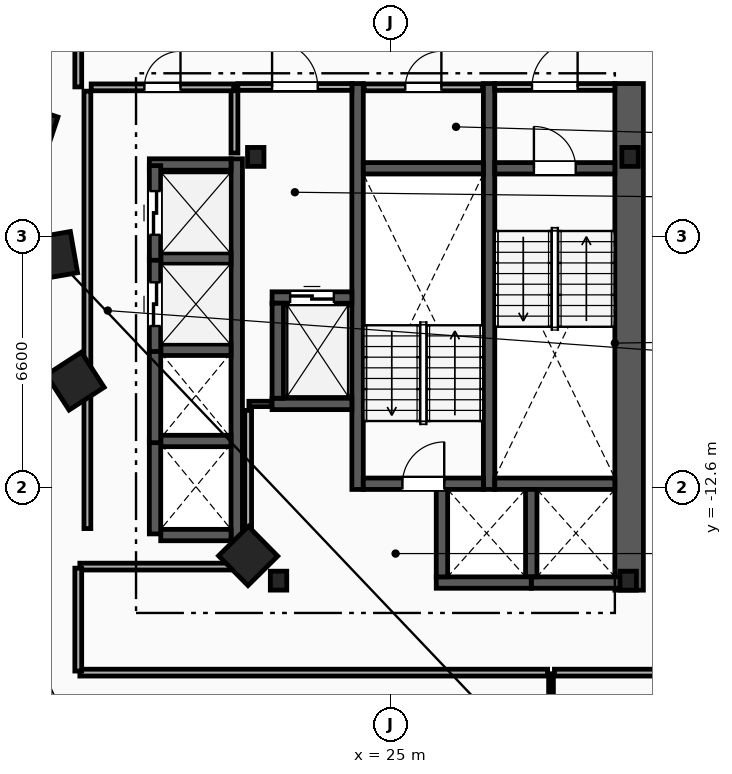
"""IFC4 building model, lengths in metres.
Left out: names, types, materials, properties, quantities, classifications, styles, units other than length and angle.
Written with IfcOpenShell. Run it as: python <this file> out.ifc"""

import sys

from ifc_helpers import new_model, si_unit, direction, frame, frame_2d, origin, origin_2d, place, context, subcontext, project, spatial, rectangle, i_section, extrude, element, fill, save


model = new_model("IFC4")
c1 = context("Model", 3, precision=1e-05, world=origin(), true_north=direction((0.0, 1.0)))
c2 = subcontext(c1, "Body", "Model", "MODEL_VIEW")
j1 = project(units=[si_unit("LENGTHUNIT", "METRE"), si_unit("PLANEANGLEUNIT", "RADIAN")], contexts=[c1])
p1 = place(None, origin())
s1 = spatial("IfcSite", under=j1, at=p1, CompositionType="ELEMENT")
p2 = place(p1, origin())
s2 = spatial("IfcBuilding", under=s1, at=p2, CompositionType="ELEMENT")
p3 = place(p2, frame((0.0, 0.0, 89.0)))
s3 = spatial("IfcBuildingStorey", under=s2, at=p3, CompositionType="ELEMENT", Elevation=89.0)
for number, where, z_axis, x_axis in (
    (1, (31.3, -3.9, 0.0), (0.0, 0.0, 1.0), (1.0, 0.0, 0.0)),
    (2, (21.45, -3.9, 0.0), (0.0, 0.0, 1.0), (1.0, 0.0, 0.0)),
    (3, (22.05, -15.05, 0.0), (0.0, 0.0, 1.0), (1.0, 0.0, 0.0)),
    (4, (31.25, -15.05, 0.0), (0.0, 0.0, 1.0), (1.0, 0.0, 0.0)),
):
    element("IfcColumn", number, at=place(p3, frame(where, z_axis=z_axis, x_axis=x_axis)), inside=s3, PredefinedType="COLUMN", context=c2, shape_type="SweptSolid", body=[
        extrude(i_section(OverallWidth=0.432, OverallDepth=0.498, WebThickness=0.056, FlangeThickness=0.089, FilletRadius=0.018, at=origin_2d()), origin(), (0.0, 0.0, 1.0), 3.6),
    ])
for number, where, z_axis, x_axis in (
    (5, (15.55, -3.2, 0.0), (0.0, 0.0, 1.0), (-0.315, -0.949, 0.0)),
    (6, (16.125, -6.5, 0.0), (0.0, 0.0, 1.0), (0.172, -0.985, 0.0)),
    (7, (16.7, -9.8, 0.0), (0.0, 0.0, 1.0), (0.544, -0.839, 0.0)),
    (8, (21.25, -14.4, 0.0), (0.0, 0.0, 1.0), (0.703, -0.711, 0.0)),
):
    element("IfcColumn", number, at=place(p3, frame(where, z_axis=z_axis, x_axis=x_axis)), inside=s3, PredefinedType="COLUMN", context=c2, shape_type="SweptSolid", body=[
        extrude(rectangle(XDim=1.1, YDim=1.1, at=origin_2d()), origin(), (0.0, 0.0, 1.0), 3.6),
    ])
p4 = place(p3, frame((31.275, -15.3, 0.0), z_axis=(0.0, 0.0, 1.0), x_axis=(0.0, 1.0, 0.0)))
e9 = element("IfcWall", 9, at=p4, inside=s3, PredefinedType="SHEAR", context=c2, shape_type="SweptSolid", body=[
    extrude(rectangle(XDim=13.33, YDim=0.75, at=frame_2d((6.665, 0.0))), origin(), (0.0, 0.0, 1.0), 3.3),
])
for number, where, z_axis, x_axis in (
    (10, (27.59, -12.65, 0.0), (0.0, 0.0, 1.0), (0.0, 1.0, 0.0)),
    (11, (24.13, -12.65, 0.0), (0.0, 0.0, 1.0), (0.0, 1.0, 0.0)),
):
    element("IfcWall", number, at=place(p3, frame(where, z_axis=z_axis, x_axis=x_axis)), inside=s3, PredefinedType="SHEAR", context=c2, shape_type="SweptSolid", body=[
        extrude(rectangle(XDim=10.68, YDim=0.3, at=frame_2d((5.34, 0.0))), origin(), (0.0, 0.0, 1.0), 3.3),
    ])
p5 = place(p3, frame((27.74, -4.2, 0.0), z_axis=(0.0, 0.0, 1.0), x_axis=(1.0, 0.0, 0.0)))
e12 = element("IfcWall", 12, at=p5, inside=s3, PredefinedType="SHEAR", context=c2, shape_type="SweptSolid", body=[
    extrude(rectangle(XDim=3.16, YDim=0.3, at=frame_2d((1.58, 0.0))), origin(), (0.0, 0.0, 1.0), 3.3),
])
p6 = place(p5, frame((1.03, 0.0, 0.0)))
e13 = element("IfcOpeningElement", 13, at=p6, cuts=e12, PredefinedType="OPENING", context=c2, shape_type="SweptSolid", body=[
    extrude(rectangle(XDim=1.1, YDim=2.15, at=frame_2d((0.55, 1.075))), frame((0.0, 0.16, 0.0), z_axis=(0.0, -1.0, 0.0), x_axis=(1.0, 0.0, 0.0)), (0.0, 0.0, 1.0), 0.32),
])
p7 = place(p3, frame((27.74, -12.5, 0.0), z_axis=(0.0, 0.0, 1.0), x_axis=(1.0, 0.0, 0.0)))
e14 = element("IfcWall", 14, at=p7, inside=s3, PredefinedType="SHEAR", context=c2, shape_type="SweptSolid", body=[
    extrude(rectangle(XDim=3.16, YDim=0.3, at=frame_2d((1.58, 0.0))), origin(), (0.0, 0.0, 1.0), 3.3),
])
p8 = place(p3, frame((24.28, -12.5, 0.0), z_axis=(0.0, 0.0, 1.0), x_axis=(1.0, 0.0, 0.0)))
e15 = element("IfcWall", 15, at=p8, inside=s3, PredefinedType="SHEAR", context=c2, shape_type="SweptSolid", body=[
    extrude(rectangle(XDim=3.16, YDim=0.3, at=frame_2d((1.58, 0.0))), origin(), (0.0, 0.0, 1.0), 3.3),
])
p9 = place(p8, frame((1.03, 0.0, 0.0)))
e16 = element("IfcOpeningElement", 16, at=p9, cuts=e15, PredefinedType="OPENING", context=c2, shape_type="SweptSolid", body=[
    extrude(rectangle(XDim=1.1, YDim=2.15, at=frame_2d((0.55, 1.075))), frame((0.0, 0.16, 0.0), z_axis=(0.0, -1.0, 0.0), x_axis=(1.0, 0.0, 0.0)), (0.0, 0.0, 1.0), 0.32),
])
p10 = place(p3, frame((24.28, -4.2, 0.0), z_axis=(0.0, 0.0, 1.0), x_axis=(1.0, 0.0, 0.0)))
e17 = element("IfcWall", 17, at=p10, inside=s3, PredefinedType="SHEAR", context=c2, shape_type="SweptSolid", body=[
    extrude(rectangle(XDim=3.16, YDim=0.3, at=frame_2d((1.58, 0.0))), origin(), (0.0, 0.0, 1.0), 3.3),
])
p11 = place(p3, frame((20.89, -3.8, 0.0), z_axis=(0.0, 0.0, 1.0), x_axis=(0.0, 1.0, 0.0)))
e18 = element("IfcWall", 18, at=p11, inside=s3, PredefinedType="PARTITIONING", context=c2, shape_type="SweptSolid", body=[
    extrude(rectangle(XDim=1.65, YDim=0.18, at=frame_2d((0.825, 0.0))), origin(), (0.0, 0.0, 1.0), 3.3),
])
p12 = place(p3, frame((20.98, -2.06, 0.0), z_axis=(0.0, 0.0, 1.0), x_axis=(1.0, 0.0, 0.0)))
e19 = element("IfcWall", 19, at=p12, inside=s3, PredefinedType="PARTITIONING", context=c2, shape_type="SweptSolid", body=[
    extrude(rectangle(XDim=3.0, YDim=0.18, at=frame_2d((1.5, 0.0))), origin(), (0.0, 0.0, 1.0), 3.3),
])
p13 = place(p12, frame((0.9, 0.0, 0.0)))
e20 = element("IfcOpeningElement", 20, at=p13, cuts=e19, PredefinedType="OPENING", context=c2, shape_type="SweptSolid", body=[
    extrude(rectangle(XDim=1.2, YDim=2.15, at=frame_2d((0.6, 1.075))), frame((0.0, 0.1, 0.0), z_axis=(0.0, -1.0, 0.0), x_axis=(1.0, 0.0, 0.0)), (0.0, 0.0, 1.0), 0.2),
])
p14 = place(p3, frame((27.74, -2.06, 0.0), z_axis=(0.0, 0.0, 1.0), x_axis=(1.0, 0.0, 0.0)))
e21 = element("IfcWall", 21, at=p14, inside=s3, PredefinedType="PARTITIONING", context=c2, shape_type="SweptSolid", body=[
    extrude(rectangle(XDim=3.16, YDim=0.18, at=frame_2d((1.58, 0.0))), origin(), (0.0, 0.0, 1.0), 3.3),
])
p15 = place(p14, frame((0.98, 0.0, 0.0)))
e22 = element("IfcOpeningElement", 22, at=p15, cuts=e21, PredefinedType="OPENING", context=c2, shape_type="SweptSolid", body=[
    extrude(rectangle(XDim=1.2, YDim=2.15, at=frame_2d((0.6, 1.075))), frame((0.0, 0.1, 0.0), z_axis=(0.0, -1.0, 0.0), x_axis=(1.0, 0.0, 0.0)), (0.0, 0.0, 1.0), 0.2),
])
p16 = place(p3, frame((21.88, -7.6, 0.0), z_axis=(0.0, 0.0, 1.0), x_axis=(1.0, 0.0, 0.0)))
e23 = element("IfcWall", 23, at=p16, inside=s3, PredefinedType="SHEAR", context=c2, shape_type="SweptSolid", body=[
    extrude(rectangle(XDim=2.1, YDim=0.3, at=frame_2d((1.05, 0.0))), origin(), (0.0, 0.0, 1.0), 3.3),
])
p17 = place(p16, frame((0.475, 0.0, 0.0)))
e24 = element("IfcOpeningElement", 24, at=p17, cuts=e23, PredefinedType="OPENING", context=c2, shape_type="SweptSolid", body=[
    extrude(rectangle(XDim=1.15, YDim=2.2, at=frame_2d((0.575, 1.1))), frame((0.0, 0.16, 0.0), z_axis=(0.0, -1.0, 0.0), x_axis=(1.0, 0.0, 0.0)), (0.0, 0.0, 1.0), 0.32),
])
p18 = place(p3, frame((21.88, -10.4, 0.0), z_axis=(0.0, 0.0, 1.0), x_axis=(1.0, 0.0, 0.0)))
e25 = element("IfcWall", 25, at=p18, inside=s3, PredefinedType="SHEAR", context=c2, shape_type="SweptSolid", body=[
    extrude(rectangle(XDim=2.1, YDim=0.3, at=frame_2d((1.05, 0.0))), origin(), (0.0, 0.0, 1.0), 3.3),
])
for number, where, z_axis, x_axis in (
    (26, (22.03, -10.25, 0.0), (0.0, 0.0, 1.0), (0.0, 1.0, 0.0)),
    (27, (28.7, -15.1, 0.0), (0.0, 0.0, 1.0), (1.0, 0.0, 0.0)),
):
    element("IfcWall", number, at=place(p3, frame(where, z_axis=z_axis, x_axis=x_axis)), inside=s3, PredefinedType="SHEAR", context=c2, shape_type="SweptSolid", body=[
        extrude(rectangle(XDim=2.5, YDim=0.3, at=frame_2d((1.25, 0.0))), origin(), (0.0, 0.0, 1.0), 3.3),
    ])
p19 = place(p3, frame((28.7, -14.95, 0.0), z_axis=(0.0, 0.0, 1.0), x_axis=(0.0, 1.0, 0.0)))
e28 = element("IfcWall", 28, at=p19, inside=s3, PredefinedType="SHEAR", context=c2, shape_type="SweptSolid", body=[
    extrude(rectangle(XDim=2.3, YDim=0.3, at=frame_2d((1.15, 0.0))), origin(), (0.0, 0.0, 1.0), 3.3),
])
p20 = place(p3, frame((26.2, -15.1, 0.0), z_axis=(0.0, 0.0, 1.0), x_axis=(1.0, 0.0, 0.0)))
e29 = element("IfcWall", 29, at=p20, inside=s3, PredefinedType="SHEAR", context=c2, shape_type="SweptSolid", body=[
    extrude(rectangle(XDim=2.5, YDim=0.3, at=frame_2d((1.25, 0.0))), origin(), (0.0, 0.0, 1.0), 3.3),
])
p21 = place(p3, frame((26.35, -14.95, 0.0), z_axis=(0.0, 0.0, 1.0), x_axis=(0.0, 1.0, 0.0)))
e30 = element("IfcWall", 30, at=p21, inside=s3, PredefinedType="SHEAR", context=c2, shape_type="SweptSolid", body=[
    extrude(rectangle(XDim=2.3, YDim=0.3, at=frame_2d((1.15, 0.0))), origin(), (0.0, 0.0, 1.0), 3.3),
])
p22 = place(p3, frame((20.95, -14.0, 0.0), z_axis=(0.0, 0.0, 1.0), x_axis=(0.0, 1.0, 0.0)))
e31 = element("IfcWall", 31, at=p22, inside=s3, PredefinedType="SHEAR", context=c2, shape_type="SweptSolid", body=[
    extrude(rectangle(XDim=10.05, YDim=0.3, at=frame_2d((5.025, 0.0))), origin(), (0.0, 0.0, 1.0), 3.3),
])
p23 = place(p3, frame((18.95, -13.85, 0.0), z_axis=(0.0, 0.0, 1.0), x_axis=(1.0, 0.0, 0.0)))
e32 = element("IfcWall", 32, at=p23, inside=s3, PredefinedType="SHEAR", context=c2, shape_type="SweptSolid", body=[
    extrude(rectangle(XDim=1.85, YDim=0.3, at=frame_2d((0.925, 0.0))), origin(), (0.0, 0.0, 1.0), 3.3),
])
p24 = place(p3, frame((18.65, -4.1, 0.0), z_axis=(0.0, 0.0, 1.0), x_axis=(1.0, 0.0, 0.0)))
e33 = element("IfcWall", 33, at=p24, inside=s3, PredefinedType="SHEAR", context=c2, shape_type="SweptSolid", body=[
    extrude(rectangle(XDim=2.15, YDim=0.3, at=frame_2d((1.075, 0.0))), origin(), (0.0, 0.0, 1.0), 3.3),
])
for number, where, z_axis, x_axis in (
    (34, (18.95, -11.375, 0.0), (0.0, 0.0, 1.0), (1.0, 0.0, 0.0)),
    (35, (18.95, -8.975, 0.0), (0.0, 0.0, 1.0), (1.0, 0.0, 0.0)),
    (36, (18.95, -6.575, 0.0), (0.0, 0.0, 1.0), (1.0, 0.0, 0.0)),
):
    element("IfcWall", number, at=place(p3, frame(where, z_axis=z_axis, x_axis=x_axis)), inside=s3, PredefinedType="SHEAR", context=c2, shape_type="SweptSolid", body=[
        extrude(rectangle(XDim=1.85, YDim=0.3, at=frame_2d((0.925, 0.0))), origin(), (0.0, 0.0, 1.0), 3.3),
    ])
for number, where, z_axis, x_axis in (
    (37, (18.8, -13.82, 0.0), (0.0, 0.0, 1.0), (0.0, 1.0, 0.0)),
    (38, (18.8, -11.42, 0.0), (0.0, 0.0, 1.0), (0.0, 1.0, 0.0)),
):
    element("IfcWall", number, at=place(p3, frame(where, z_axis=z_axis, x_axis=x_axis)), inside=s3, PredefinedType="SHEAR", context=c2, shape_type="SweptSolid", body=[
        extrude(rectangle(XDim=2.49, YDim=0.3, at=frame_2d((1.245, 0.0))), origin(), (0.0, 0.0, 1.0), 3.3),
    ])
p25 = place(p3, frame((18.8, -9.02, 0.0), z_axis=(0.0, 0.0, 1.0), x_axis=(0.0, 1.0, 0.0)))
e39 = element("IfcWall", 39, at=p25, inside=s3, PredefinedType="SHEAR", context=c2, shape_type="SweptSolid", body=[
    extrude(rectangle(XDim=2.49, YDim=0.3, at=frame_2d((1.245, 0.0))), origin(), (0.0, 0.0, 1.0), 3.3),
])
p26 = place(p25, frame((0.67, 0.0, 0.0)))
e40 = element("IfcOpeningElement", 40, at=p26, cuts=e39, PredefinedType="OPENING", context=c2, shape_type="SweptSolid", body=[
    extrude(rectangle(XDim=1.15, YDim=2.2, at=frame_2d((0.575, 1.1))), frame((0.0, 0.16, 0.0), z_axis=(0.0, -1.0, 0.0), x_axis=(1.0, 0.0, 0.0)), (0.0, 0.0, 1.0), 0.32),
])
p27 = place(p3, frame((18.8, -6.62, 0.0), z_axis=(0.0, 0.0, 1.0), x_axis=(0.0, 1.0, 0.0)))
e41 = element("IfcWall", 41, at=p27, inside=s3, PredefinedType="SHEAR", context=c2, shape_type="SweptSolid", body=[
    extrude(rectangle(XDim=2.49, YDim=0.3, at=frame_2d((1.245, 0.0))), origin(), (0.0, 0.0, 1.0), 3.3),
])
p28 = place(p27, frame((0.67, 0.0, 0.0)))
e42 = element("IfcOpeningElement", 42, at=p28, cuts=e41, PredefinedType="OPENING", context=c2, shape_type="SweptSolid", body=[
    extrude(rectangle(XDim=1.15, YDim=2.2, at=frame_2d((0.575, 1.1))), frame((0.0, 0.16, 0.0), z_axis=(0.0, -1.0, 0.0), x_axis=(1.0, 0.0, 0.0)), (0.0, 0.0, 1.0), 0.32),
])
p29 = place(p3, frame((17.02, -13.68, 0.0), z_axis=(0.0, 0.0, 1.0), x_axis=(0.0, 1.0, 0.0)))
e43 = element("IfcWall", 43, at=p29, inside=s3, PredefinedType="PARTITIONING", context=c2, shape_type="SweptSolid", body=[
    extrude(rectangle(XDim=11.51, YDim=0.18, at=frame_2d((5.755, 0.0))), origin(), (0.0, 0.0, 1.0), 3.3),
])
p30 = place(p3, frame((17.12, -2.07, 0.0), z_axis=(0.0, 0.0, 1.0), x_axis=(1.0, 0.0, 0.0)))
e44 = element("IfcWall", 44, at=p30, inside=s3, PredefinedType="PARTITIONING", context=c2, shape_type="SweptSolid", body=[
    extrude(rectangle(XDim=3.75, YDim=0.18, at=frame_2d((1.875, 0.0))), origin(), (0.0, 0.0, 1.0), 3.3),
])
p31 = place(p30, frame((1.4, 0.0, 0.0)))
e45 = element("IfcOpeningElement", 45, at=p31, cuts=e44, PredefinedType="OPENING", context=c2, shape_type="SweptSolid", body=[
    extrude(rectangle(XDim=0.95, YDim=2.1, at=frame_2d((0.475, 1.05))), frame((0.0, 0.1, 0.0), z_axis=(0.0, -1.0, 0.0), x_axis=(1.0, 0.0, 0.0)), (0.0, 0.0, 1.0), 0.2),
])
p32 = place(p3, frame((21.27, -10.4, 0.0), z_axis=(0.0, 0.0, 1.0), x_axis=(1.0, 0.0, 0.0)))
e46 = element("IfcWall", 46, at=p32, inside=s3, PredefinedType="PARTITIONING", context=c2, shape_type="SweptSolid", body=[
    extrude(rectangle(XDim=0.59, YDim=0.14, at=frame_2d((0.295, 0.0))), origin(), (0.0, 0.0, 1.0), 3.3),
])
p33 = place(p3, frame((21.25, -14.93, 0.0), z_axis=(0.0, 0.0, 1.0), x_axis=(0.0, 1.0, 0.0)))
e47 = element("IfcWall", 47, at=p33, inside=s3, PredefinedType="PARTITIONING", context=c2, shape_type="SweptSolid", body=[
    extrude(rectangle(XDim=4.36, YDim=0.18, at=frame_2d((2.18, 0.0))), origin(), (0.0, 0.0, 1.0), 3.3),
])
p34 = place(p3, frame((24.3, -2.07, 0.0), z_axis=(0.0, 0.0, 1.0), x_axis=(1.0, 0.0, 0.0)))
e48 = element("IfcWall", 48, at=p34, inside=s3, PredefinedType="PARTITIONING", context=c2, shape_type="SweptSolid", body=[
    extrude(rectangle(XDim=3.12, YDim=0.18, at=frame_2d((1.56, 0.0))), origin(), (0.0, 0.0, 1.0), 3.3),
])
p35 = place(p34, frame((1.085, 0.0, 0.0)))
e49 = element("IfcOpeningElement", 49, at=p35, cuts=e48, PredefinedType="OPENING", context=c2, shape_type="SweptSolid", body=[
    extrude(rectangle(XDim=0.95, YDim=2.1, at=frame_2d((0.475, 1.05))), frame((0.0, 0.1, 0.0), z_axis=(0.0, -1.0, 0.0), x_axis=(1.0, 0.0, 0.0)), (0.0, 0.0, 1.0), 0.2),
])
p36 = place(p3, frame((29.22, -25.966, 0.0), z_axis=(0.0, 0.0, 1.0), x_axis=(0.0, 1.0, 0.0)))
e50 = element("IfcWall", 50, at=p36, inside=s3, PredefinedType="PARTITIONING", context=c2, shape_type="SweptSolid", body=[
    extrude(rectangle(XDim=8.466, YDim=0.125, at=frame_2d((4.233, 0.0))), origin(), (0.0, 0.0, 1.0), 3.3),
])
p37 = place(p3, frame((29.31, -17.47, 0.0), z_axis=(0.0, 0.0, 1.0), x_axis=(1.0, 0.0, 0.0)))
e51 = element("IfcWall", 51, at=p37, inside=s3, PredefinedType="PARTITIONING", context=c2, shape_type="SweptSolid", body=[
    extrude(rectangle(XDim=4.318, YDim=0.18, at=frame_2d((2.159, 0.0))), origin(), (0.0, 0.0, 1.0), 3.3),
])
p38 = place(p3, frame((16.822, -17.47, 0.0), z_axis=(0.0, 0.0, 1.0), x_axis=(1.0, 0.0, 0.0)))
e52 = element("IfcWall", 52, at=p38, inside=s3, PredefinedType="PARTITIONING", context=c2, shape_type="SweptSolid", body=[
    extrude(rectangle(XDim=12.308, YDim=0.18, at=frame_2d((6.154, 0.0))), origin(), (0.0, 0.0, 1.0), 3.3),
])
p39 = place(p3, frame((21.178, -14.68, 0.0), z_axis=(0.0, 0.0, 1.0), x_axis=(-1.0, 0.0, 0.0)))
e53 = element("IfcWall", 53, at=p39, inside=s3, PredefinedType="PARTITIONING", context=c2, shape_type="SweptSolid", body=[
    extrude(rectangle(XDim=4.357, YDim=0.18, at=frame_2d((2.178, 0.0))), origin(), (0.0, 0.0, 1.0), 3.3),
])
p40 = place(p3, frame((16.78, -14.721, 0.0), z_axis=(0.0, 0.0, 1.0), x_axis=(0.0, -1.0, 0.0)))
e54 = element("IfcWall", 54, at=p40, inside=s3, PredefinedType="PARTITIONING", context=c2, shape_type="SweptSolid", body=[
    extrude(rectangle(XDim=2.707, YDim=0.18, at=frame_2d((1.354, 0.0))), origin(), (0.0, 0.0, 1.0), 3.3),
])
p41 = place(p3, frame((16.78, 0.329, 0.0), z_axis=(0.0, 0.0, 1.0), x_axis=(0.0, -1.0, 0.0)))
e55 = element("IfcWall", 55, at=p41, inside=s3, PredefinedType="PARTITIONING", context=c2, shape_type="SweptSolid", body=[
    extrude(rectangle(XDim=2.387, YDim=0.18, at=frame_2d((1.194, 0.0))), origin(), (0.0, 0.0, 1.0), 3.3),
])
p42 = place(p6, origin())
e56 = element("IfcDoor", 56, at=p42, inside=s3, OperationType="SINGLE_SWING_LEFT", PredefinedType="DOOR", context=c2, shape_type="SweptSolid", body=[
    extrude(rectangle(XDim=1.1, YDim=2.15, at=frame_2d((0.55, 1.075))), frame((0.0, 0.025, 0.0), z_axis=(0.0, -1.0, 0.0), x_axis=(1.0, 0.0, 0.0)), (0.0, 0.0, 1.0), 0.05),
])
fill(e13, e56)
p43 = place(p9, origin())
e57 = element("IfcDoor", 57, at=p43, inside=s3, OperationType="SINGLE_SWING_RIGHT", PredefinedType="DOOR", context=c2, shape_type="SweptSolid", body=[
    extrude(rectangle(XDim=1.1, YDim=2.15, at=frame_2d((0.55, 1.075))), frame((0.0, 0.025, 0.0), z_axis=(0.0, -1.0, 0.0), x_axis=(1.0, 0.0, 0.0)), (0.0, 0.0, 1.0), 0.05),
])
fill(e16, e57)
p44 = place(p13, origin())
e58 = element("IfcDoor", 58, at=p44, inside=s3, OperationType="SINGLE_SWING_LEFT", PredefinedType="DOOR", context=c2, shape_type="SweptSolid", body=[
    extrude(rectangle(XDim=1.2, YDim=2.15, at=frame_2d((0.6, 1.075))), frame((0.0, 0.025, 0.0), z_axis=(0.0, -1.0, 0.0), x_axis=(1.0, 0.0, 0.0)), (0.0, 0.0, 1.0), 0.05),
])
fill(e20, e58)
p45 = place(p15, origin())
e59 = element("IfcDoor", 59, at=p45, inside=s3, OperationType="SINGLE_SWING_RIGHT", PredefinedType="DOOR", context=c2, shape_type="SweptSolid", body=[
    extrude(rectangle(XDim=1.2, YDim=2.15, at=frame_2d((0.6, 1.075))), frame((0.0, 0.025, 0.0), z_axis=(0.0, -1.0, 0.0), x_axis=(1.0, 0.0, 0.0)), (0.0, 0.0, 1.0), 0.05),
])
fill(e22, e59)
p46 = place(p17, origin())
e60 = element("IfcDoor", 60, at=p46, inside=s3, OperationType="SLIDING_TO_LEFT", PredefinedType="TRAPDOOR", context=c2, shape_type="SweptSolid", body=[
    extrude(rectangle(XDim=1.15, YDim=2.2, at=frame_2d((0.575, 1.1))), frame((0.0, 0.025, 0.0), z_axis=(0.0, -1.0, 0.0), x_axis=(1.0, 0.0, 0.0)), (0.0, 0.0, 1.0), 0.05),
])
fill(e24, e60)
p47 = place(p26, origin())
e61 = element("IfcDoor", 61, at=p47, inside=s3, OperationType="SLIDING_TO_LEFT", PredefinedType="TRAPDOOR", context=c2, shape_type="SweptSolid", body=[
    extrude(rectangle(XDim=1.15, YDim=2.2, at=frame_2d((0.575, 1.1))), frame((0.0, 0.025, 0.0), z_axis=(0.0, -1.0, 0.0), x_axis=(1.0, 0.0, 0.0)), (0.0, 0.0, 1.0), 0.05),
])
fill(e40, e61)
p48 = place(p28, origin())
e62 = element("IfcDoor", 62, at=p48, inside=s3, OperationType="SLIDING_TO_LEFT", PredefinedType="TRAPDOOR", context=c2, shape_type="SweptSolid", body=[
    extrude(rectangle(XDim=1.15, YDim=2.2, at=frame_2d((0.575, 1.1))), frame((0.0, 0.025, 0.0), z_axis=(0.0, -1.0, 0.0), x_axis=(1.0, 0.0, 0.0)), (0.0, 0.0, 1.0), 0.05),
])
fill(e42, e62)
p49 = place(p31, origin())
e63 = element("IfcDoor", 63, at=p49, inside=s3, OperationType="SINGLE_SWING_RIGHT", PredefinedType="DOOR", context=c2, shape_type="SweptSolid", body=[
    extrude(rectangle(XDim=0.95, YDim=2.1, at=frame_2d((0.475, 1.05))), frame((0.0, 0.025, 0.0), z_axis=(0.0, -1.0, 0.0), x_axis=(1.0, 0.0, 0.0)), (0.0, 0.0, 1.0), 0.05),
])
fill(e45, e63)
p50 = place(p35, origin())
e64 = element("IfcDoor", 64, at=p50, inside=s3, OperationType="SINGLE_SWING_RIGHT", PredefinedType="DOOR", context=c2, shape_type="SweptSolid", body=[
    extrude(rectangle(XDim=0.95, YDim=2.1, at=frame_2d((0.475, 1.05))), frame((0.0, 0.025, 0.0), z_axis=(0.0, -1.0, 0.0), x_axis=(1.0, 0.0, 0.0)), (0.0, 0.0, 1.0), 0.05),
])
fill(e49, e64)
save(model, sys.argv[1])
